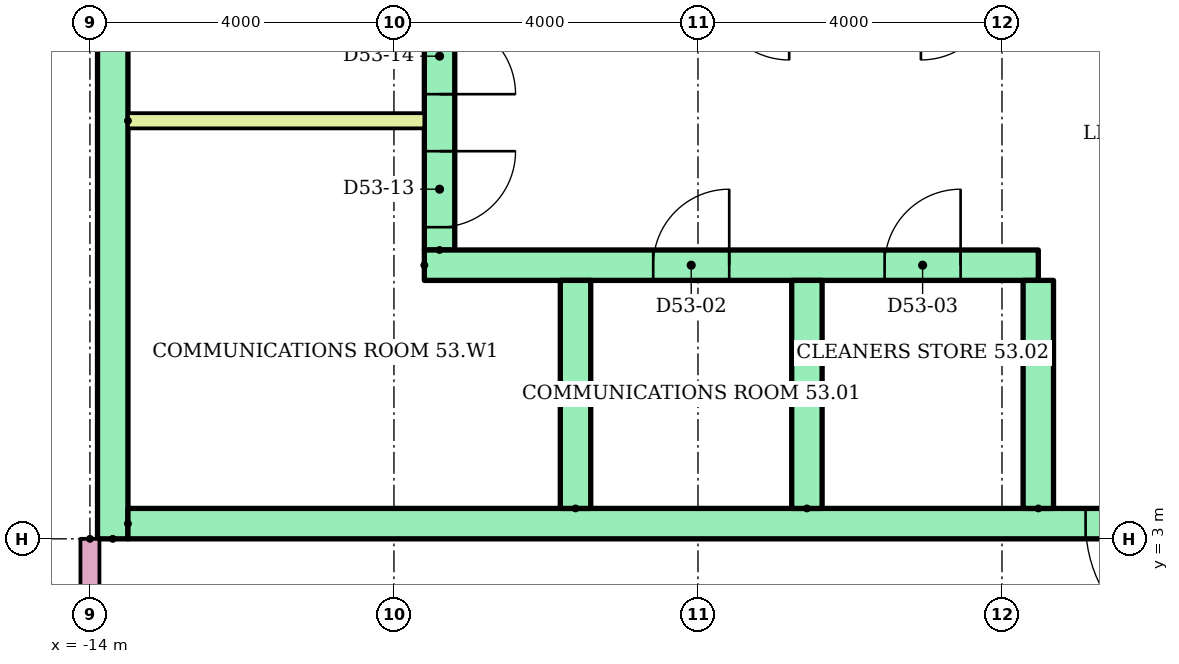
"""IFC4 building model, lengths in metres.
Left out: names, types, materials, properties, quantities, classifications, styles, units other than length and angle.
Written with IfcOpenShell. Run it as: python <this file> out.ifc"""

import sys

from ifc_helpers import new_model, si_unit, direction, frame, frame_2d, origin, place, context, subcontext, project, spatial, rectangle, extrude, element, fill, save


model = new_model("IFC4")
c1 = context("Model", 3, precision=1e-05, world=origin(), true_north=direction((0.0, 1.0)))
c2 = subcontext(c1, "Body", "Model", "MODEL_VIEW")
j1 = project(units=[si_unit("LENGTHUNIT", "METRE"), si_unit("PLANEANGLEUNIT", "RADIAN")], contexts=[c1])
p1 = place(None, origin())
s1 = spatial("IfcSite", under=j1, at=p1, CompositionType="ELEMENT")
p2 = place(p1, origin())
s2 = spatial("IfcBuilding", under=s1, at=p2, CompositionType="ELEMENT")
p3 = place(p2, frame((0.0, 0.0, 207.6)))
s3 = spatial("IfcBuildingStorey", under=s2, at=p3, CompositionType="ELEMENT", Elevation=207.6)
p4 = place(p3, frame((-13.7, 3.0, 0.0), z_axis=(0.0, 0.0, 1.0), x_axis=(0.0, 1.0, 0.0)))
e1 = element("IfcWall", 1, at=p4, inside=s3, PredefinedType="SHEAR", context=c2, shape_type="SweptSolid", body=[
    extrude(rectangle(XDim=17.0, YDim=0.4, at=frame_2d((8.5, 0.0))), origin(), (0.0, 0.0, 1.0), 2.92),
])
p5 = place(p3, frame((-9.4, 6.8, 0.0), z_axis=(0.0, 0.0, 1.0), x_axis=(0.0, 1.0, 0.0)))
e2 = element("IfcWall", 2, at=p5, inside=s3, PredefinedType="SHEAR", context=c2, shape_type="SweptSolid", body=[
    extrude(rectangle(XDim=12.7, YDim=0.4, at=frame_2d((6.35, 0.0))), origin(), (0.0, 0.0, 1.0), 2.92),
])
p6 = place(p5, frame((0.3, 0.0, 0.0)))
e3 = element("IfcOpeningElement", 3, at=p6, cuts=e2, PredefinedType="OPENING", context=c2, shape_type="SweptSolid", body=[
    extrude(rectangle(XDim=1.0, YDim=2.1, at=frame_2d((0.5, 1.05))), frame((0.0, 0.21, 0.0), z_axis=(0.0, -1.0, 0.0), x_axis=(1.0, 0.0, 0.0)), (0.0, 0.0, 1.0), 0.42),
])
p7 = place(p5, frame((2.05, 0.0, 0.0)))
e4 = element("IfcOpeningElement", 4, at=p7, cuts=e2, PredefinedType="OPENING", context=c2, shape_type="SweptSolid", body=[
    extrude(rectangle(XDim=1.0, YDim=2.1, at=frame_2d((0.5, 1.05))), frame((0.0, 0.21, 0.0), z_axis=(0.0, -1.0, 0.0), x_axis=(1.0, 0.0, 0.0)), (0.0, 0.0, 1.0), 0.42),
])
p8 = place(p5, frame((7.925, 0.0, 0.0)))
e5 = element("IfcOpeningElement", 5, at=p8, cuts=e2, PredefinedType="OPENING", context=c2, shape_type="SweptSolid", body=[
    extrude(rectangle(XDim=1.0, YDim=2.1, at=frame_2d((0.5, 1.05))), frame((0.0, 0.21, 0.0), z_axis=(0.0, -1.0, 0.0), x_axis=(1.0, 0.0, 0.0)), (0.0, 0.0, 1.0), 0.42),
])
p9 = place(p3, frame((-13.5, 3.2, 0.0)))
e6 = element("IfcWall", 6, at=p9, inside=s3, PredefinedType="SHEAR", context=c2, shape_type="SweptSolid", body=[
    extrude(rectangle(XDim=27.0, YDim=0.4, at=frame_2d((13.5, 0.0))), origin(), (0.0, 0.0, 1.0), 2.92),
])
p10 = place(p9, frame((22.083, 0.0, 0.0)))
e7 = element("IfcOpeningElement", 7, at=p10, cuts=e6, PredefinedType="OPENING", context=c2, shape_type="SweptSolid", body=[
    extrude(rectangle(XDim=1.1, YDim=2.1, at=frame_2d((0.55, 1.05))), frame((0.0, 0.21, 0.0), z_axis=(0.0, -1.0, 0.0), x_axis=(1.0, 0.0, 0.0)), (0.0, 0.0, 1.0), 0.42),
])
p11 = place(p9, frame((25.128, 0.0, 0.0)))
e8 = element("IfcOpeningElement", 8, at=p11, cuts=e6, PredefinedType="OPENING", context=c2, shape_type="SweptSolid", body=[
    extrude(rectangle(XDim=1.1, YDim=2.1, at=frame_2d((0.55, 1.05))), frame((0.0, 0.21, 0.0), z_axis=(0.0, -1.0, 0.0), x_axis=(1.0, 0.0, 0.0)), (0.0, 0.0, 1.0), 0.42),
])
p12 = place(p9, frame((12.6, 0.0, 0.0)))
e9 = element("IfcOpeningElement", 9, at=p12, cuts=e6, PredefinedType="OPENING", context=c2, shape_type="SweptSolid", body=[
    extrude(rectangle(XDim=1.8, YDim=2.1, at=frame_2d((0.9, 1.05))), frame((0.0, 0.21, 0.0), z_axis=(0.0, -1.0, 0.0), x_axis=(1.0, 0.0, 0.0)), (0.0, 0.0, 1.0), 0.42),
])
p13 = place(p3, frame((-9.6, 6.6, 0.0)))
e10 = element("IfcWall", 10, at=p13, inside=s3, PredefinedType="SHEAR", context=c2, shape_type="SweptSolid", body=[
    extrude(rectangle(XDim=8.078, YDim=0.4, at=frame_2d((4.039, 0.0))), origin(), (0.0, 0.0, 1.0), 2.92),
])
p14 = place(p13, frame((3.011, 0.0, 0.0)))
e11 = element("IfcOpeningElement", 11, at=p14, cuts=e10, PredefinedType="OPENING", context=c2, shape_type="SweptSolid", body=[
    extrude(rectangle(XDim=1.0, YDim=2.1, at=frame_2d((0.5, 1.05))), frame((0.0, 0.21, 0.0), z_axis=(0.0, -1.0, 0.0), x_axis=(1.0, 0.0, 0.0)), (0.0, 0.0, 1.0), 0.42),
])
p15 = place(p13, frame((6.056, 0.0, 0.0)))
e12 = element("IfcOpeningElement", 12, at=p15, cuts=e10, PredefinedType="OPENING", context=c2, shape_type="SweptSolid", body=[
    extrude(rectangle(XDim=1.0, YDim=2.1, at=frame_2d((0.5, 1.05))), frame((0.0, 0.21, 0.0), z_axis=(0.0, -1.0, 0.0), x_axis=(1.0, 0.0, 0.0)), (0.0, 0.0, 1.0), 0.42),
])
for number, where, z_axis, x_axis in (
    (13, (-7.611, 3.4, 0.0), (0.0, 0.0, 1.0), (0.0, 1.0, 0.0)),
    (14, (-4.567, 3.4, 0.0), (0.0, 0.0, 1.0), (0.0, 1.0, 0.0)),
    (15, (-1.522, 3.4, 0.0), (0.0, 0.0, 1.0), (0.0, 1.0, 0.0)),
):
    element("IfcWall", number, at=place(p3, frame(where, z_axis=z_axis, x_axis=x_axis)), inside=s3, PredefinedType="SHEAR", context=c2, shape_type="SweptSolid", body=[
        extrude(rectangle(XDim=3.0, YDim=0.4, at=frame_2d((1.5, 0.0))), origin(), (0.0, 0.0, 1.0), 2.92),
    ])
p16 = place(p3, frame((-13.5, 8.5, 0.0)))
e16 = element("IfcWall", 16, at=p16, inside=s3, PredefinedType="PARTITIONING", context=c2, shape_type="SweptSolid", body=[
    extrude(rectangle(XDim=3.9, YDim=0.2, at=frame_2d((1.95, 0.0))), origin(), (0.0, 0.0, 1.0), 2.92),
])
p17 = place(p3, frame((-14.0, 3.0, 0.0), z_axis=(0.0, 0.0, 1.0), x_axis=(0.0, -1.0, 0.0)))
e17 = element("IfcWall", 17, at=p17, inside=s3, PredefinedType="PARTITIONING", context=c2, shape_type="SweptSolid", body=[
    extrude(rectangle(XDim=1.6, YDim=0.25, at=frame_2d((0.8, 0.0))), origin(), (0.0, 0.0, 1.0), 2.4),
])
p18 = place(p12, frame((1.8, 0.0, 0.0), z_axis=(0.0, 0.0, 1.0), x_axis=(-1.0, 0.0, 0.0)))
e18 = element("IfcDoor", 18, at=p18, inside=s3, OperationType="DOUBLE_DOOR_SINGLE_SWING", PredefinedType="DOOR", context=c2, shape_type="SweptSolid", body=[
    extrude(rectangle(XDim=1.8, YDim=2.1, at=frame_2d((0.9, 1.05))), frame((0.0, 0.025, 0.0), z_axis=(0.0, -1.0, 0.0), x_axis=(1.0, 0.0, 0.0)), (0.0, 0.0, 1.0), 0.05),
])
fill(e9, e18)
p19 = place(p14, origin())
e19 = element("IfcDoor", 19, at=p19, inside=s3, OperationType="SINGLE_SWING_RIGHT", PredefinedType="DOOR", context=c2, shape_type="SweptSolid", body=[
    extrude(rectangle(XDim=1.0, YDim=2.1, at=frame_2d((0.5, 1.05))), frame((0.0, 0.025, 0.0), z_axis=(0.0, -1.0, 0.0), x_axis=(1.0, 0.0, 0.0)), (0.0, 0.0, 1.0), 0.05),
])
fill(e11, e19)
p20 = place(p15, origin())
e20 = element("IfcDoor", 20, at=p20, inside=s3, OperationType="SINGLE_SWING_RIGHT", PredefinedType="DOOR", context=c2, shape_type="SweptSolid", body=[
    extrude(rectangle(XDim=1.0, YDim=2.1, at=frame_2d((0.5, 1.05))), frame((0.0, 0.025, 0.0), z_axis=(0.0, -1.0, 0.0), x_axis=(1.0, 0.0, 0.0)), (0.0, 0.0, 1.0), 0.05),
])
fill(e12, e20)
p21 = place(p6, frame((1.0, 0.0, 0.0), z_axis=(0.0, 0.0, 1.0), x_axis=(-1.0, 0.0, 0.0)))
e21 = element("IfcDoor", 21, at=p21, inside=s3, OperationType="SINGLE_SWING_RIGHT", PredefinedType="DOOR", context=c2, shape_type="SweptSolid", body=[
    extrude(rectangle(XDim=1.0, YDim=2.1, at=frame_2d((0.5, 1.05))), frame((0.0, 0.025, 0.0), z_axis=(0.0, -1.0, 0.0), x_axis=(1.0, 0.0, 0.0)), (0.0, 0.0, 1.0), 0.05),
])
fill(e3, e21)
p22 = place(p7, frame((1.0, 0.0, 0.0), z_axis=(0.0, 0.0, 1.0), x_axis=(-1.0, 0.0, 0.0)))
e22 = element("IfcDoor", 22, at=p22, inside=s3, OperationType="SINGLE_SWING_LEFT", PredefinedType="DOOR", context=c2, shape_type="SweptSolid", body=[
    extrude(rectangle(XDim=1.0, YDim=2.1, at=frame_2d((0.5, 1.05))), frame((0.0, 0.025, 0.0), z_axis=(0.0, -1.0, 0.0), x_axis=(1.0, 0.0, 0.0)), (0.0, 0.0, 1.0), 0.05),
])
fill(e4, e22)
save(model, sys.argv[1])
